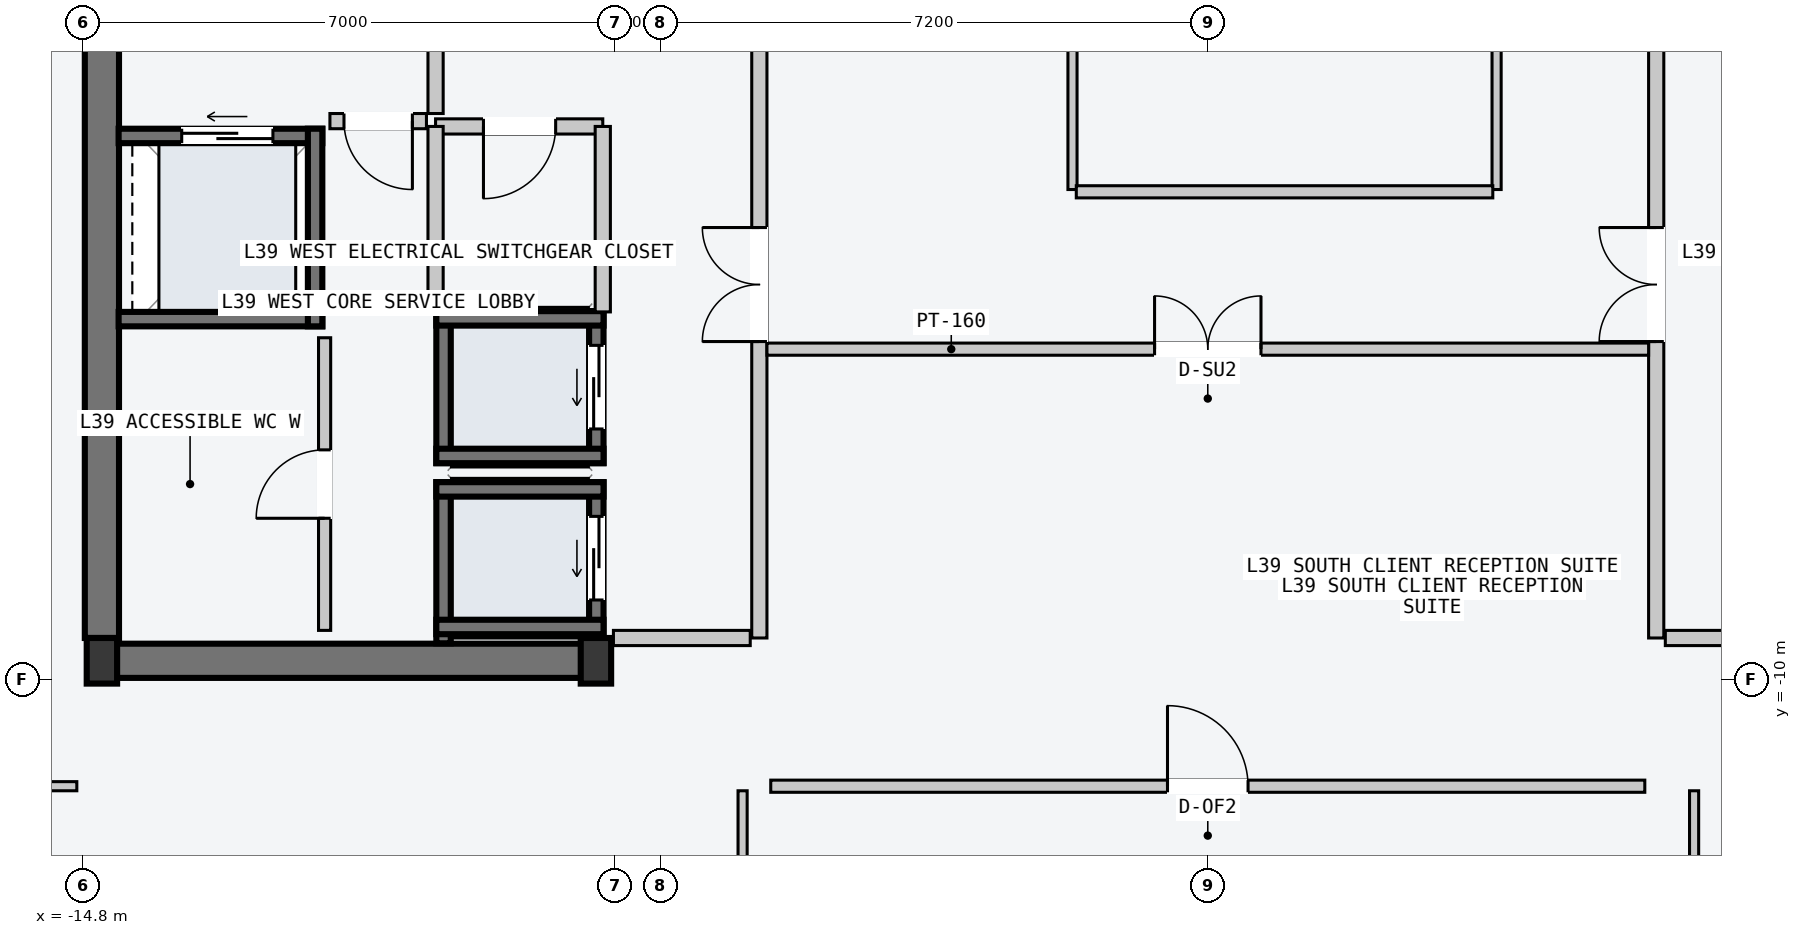
"""IFC4 building model, lengths in metres.
Left out: names, types, materials, properties, quantities, classifications, styles, units other than length and angle.
Written with IfcOpenShell. Run it as: python <this file> out.ifc"""

import sys

from ifc_helpers import new_model, si_unit, direction, frame, frame_2d, origin, origin_2d, place, context, subcontext, project, spatial, rectangle, i_section, extrude, element, fill, save


model = new_model("IFC4")
c1 = context("Model", 3, precision=1e-05, world=origin(), true_north=direction((0.0, 1.0)))
c2 = subcontext(c1, "Body", "Model", "MODEL_VIEW")
j1 = project(units=[si_unit("LENGTHUNIT", "METRE"), si_unit("PLANEANGLEUNIT", "RADIAN")], contexts=[c1])
p1 = place(None, origin())
s1 = spatial("IfcSite", under=j1, at=p1, CompositionType="ELEMENT")
p2 = place(p1, origin())
s2 = spatial("IfcBuilding", under=s1, at=p2, CompositionType="ELEMENT")
p3 = place(p2, frame((0.0, 0.0, 150.6)))
s3 = spatial("IfcBuildingStorey", under=s2, at=p3, CompositionType="ELEMENT", Elevation=150.6)
p4 = place(p3, frame((-14.53, -9.75, -0.2), z_axis=(0.0, 0.0, 1.0), x_axis=(1.0, 0.0, 0.0)))
e1 = element("IfcWall", 1, at=p4, inside=s3, PredefinedType="SHEAR", context=c2, shape_type="SweptSolid", body=[
    extrude(rectangle(XDim=6.46, YDim=0.45, at=frame_2d((3.23, 0.0))), origin(), (0.0, 0.0, 1.0), 4.5),
])
p5 = place(p3, frame((-14.55, -9.45, -0.2), z_axis=(0.0, 0.0, 1.0), x_axis=(0.0, 1.0, 0.0)))
e2 = element("IfcWall", 2, at=p5, inside=s3, PredefinedType="SHEAR", context=c2, shape_type="SweptSolid", body=[
    extrude(rectangle(XDim=9.15, YDim=0.45, at=frame_2d((4.575, 0.0))), origin(), (0.0, 0.0, 1.0), 4.5),
])
for number, where, z_axis, x_axis in (
    (3, (-14.55, -9.75, 0.0), (0.0, 0.0, 1.0), (1.0, 0.0, 0.0)),
    (4, (-8.05, -9.75, 0.0), (0.0, 0.0, 1.0), (1.0, 0.0, 0.0)),
):
    element("IfcColumn", number, at=place(p3, frame(where, z_axis=z_axis, x_axis=x_axis)), inside=s3, PredefinedType="COLUMN", context=c2, shape_type="SweptSolid", body=[
        extrude(i_section(OverallWidth=0.4, OverallDepth=0.6, WebThickness=0.022, FlangeThickness=0.036, at=origin_2d()), origin(), (0.0, 0.0, 1.0), 4.5),
    ])
p6 = place(p3, frame((-8.045, -9.52, -0.2), z_axis=(0.0, 0.0, 1.0), x_axis=(0.0, 1.0, 0.0)))
e5 = element("IfcWall", 5, at=p6, inside=s3, PredefinedType="SOLIDWALL", context=c2, shape_type="SweptSolid", body=[
    extrude(rectangle(XDim=2.12, YDim=0.19, at=frame_2d((1.06, 0.0))), origin(), (0.0, 0.0, 1.0), 4.5),
])
p7 = place(p6, frame((0.57, 0.0, 0.2)))
e6 = element("IfcOpeningElement", 6, at=p7, cuts=e5, PredefinedType="OPENING", context=c2, shape_type="SweptSolid", body=[
    extrude(rectangle(XDim=1.1, YDim=2.2, at=frame_2d((0.55, 1.1))), frame((0.0, 0.105, 0.0), z_axis=(0.0, -1.0, 0.0), x_axis=(1.0, 0.0, 0.0)), (0.0, 0.0, 1.0), 0.21),
])
p8 = place(p3, frame((-10.055, -9.52, -0.2), z_axis=(0.0, 0.0, 1.0), x_axis=(0.0, 1.0, 0.0)))
e7 = element("IfcWall", 7, at=p8, inside=s3, PredefinedType="SOLIDWALL", context=c2, shape_type="SweptSolid", body=[
    extrude(rectangle(XDim=2.12, YDim=0.19, at=frame_2d((1.06, 0.0))), origin(), (0.0, 0.0, 1.0), 4.5),
])
for number, where, z_axis, x_axis in (
    (8, (-10.15, -7.495, -0.2), (0.0, 0.0, 1.0), (1.0, 0.0, 0.0)),
    (9, (-10.15, -9.305, -0.2), (0.0, 0.0, 1.0), (1.0, 0.0, 0.0)),
):
    element("IfcWall", number, at=place(p3, frame(where, z_axis=z_axis, x_axis=x_axis)), inside=s3, PredefinedType="SOLIDWALL", context=c2, shape_type="SweptSolid", body=[
        extrude(rectangle(XDim=2.2, YDim=0.19, at=frame_2d((1.1, 0.0))), origin(), (0.0, 0.0, 1.0), 4.5),
    ])
p9 = place(p3, frame((-8.045, -7.15, -0.2), z_axis=(0.0, 0.0, 1.0), x_axis=(0.0, 1.0, 0.0)))
e10 = element("IfcWall", 10, at=p9, inside=s3, PredefinedType="SOLIDWALL", context=c2, shape_type="SweptSolid", body=[
    extrude(rectangle(XDim=2.0, YDim=0.19, at=frame_2d((1.0, 0.0))), origin(), (0.0, 0.0, 1.0), 4.5),
])
p10 = place(p9, frame((0.45, 0.0, 0.2)))
e11 = element("IfcOpeningElement", 11, at=p10, cuts=e10, PredefinedType="OPENING", context=c2, shape_type="SweptSolid", body=[
    extrude(rectangle(XDim=1.1, YDim=2.2, at=frame_2d((0.55, 1.1))), frame((0.0, 0.105, 0.0), z_axis=(0.0, -1.0, 0.0), x_axis=(1.0, 0.0, 0.0)), (0.0, 0.0, 1.0), 0.21),
])
p11 = place(p3, frame((-10.055, -7.15, -0.2), z_axis=(0.0, 0.0, 1.0), x_axis=(0.0, 1.0, 0.0)))
e12 = element("IfcWall", 12, at=p11, inside=s3, PredefinedType="SOLIDWALL", context=c2, shape_type="SweptSolid", body=[
    extrude(rectangle(XDim=2.0, YDim=0.19, at=frame_2d((1.0, 0.0))), origin(), (0.0, 0.0, 1.0), 4.5),
])
for number, where, z_axis, x_axis in (
    (13, (-10.15, -5.245, -0.2), (0.0, 0.0, 1.0), (1.0, 0.0, 0.0)),
    (14, (-10.15, -7.055, -0.2), (0.0, 0.0, 1.0), (1.0, 0.0, 0.0)),
):
    element("IfcWall", number, at=place(p3, frame(where, z_axis=z_axis, x_axis=x_axis)), inside=s3, PredefinedType="SOLIDWALL", context=c2, shape_type="SweptSolid", body=[
        extrude(rectangle(XDim=2.2, YDim=0.19, at=frame_2d((1.1, 0.0))), origin(), (0.0, 0.0, 1.0), 4.5),
    ])
p12 = place(p3, frame((-14.33, -2.845, -0.2), z_axis=(0.0, 0.0, 1.0), x_axis=(1.0, 0.0, 0.0)))
e15 = element("IfcWall", 15, at=p12, inside=s3, PredefinedType="SOLIDWALL", context=c2, shape_type="SweptSolid", body=[
    extrude(rectangle(XDim=2.68, YDim=0.19, at=frame_2d((1.34, 0.0))), origin(), (0.0, 0.0, 1.0), 4.5),
])
p13 = place(p12, frame((0.83, 0.0, 0.2)))
e16 = element("IfcOpeningElement", 16, at=p13, cuts=e15, PredefinedType="OPENING", context=c2, shape_type="SweptSolid", body=[
    extrude(rectangle(XDim=1.2, YDim=2.2, at=frame_2d((0.6, 1.1))), frame((0.0, 0.105, 0.0), z_axis=(0.0, -1.0, 0.0), x_axis=(1.0, 0.0, 0.0)), (0.0, 0.0, 1.0), 0.21),
])
p14 = place(p3, frame((-14.33, -5.255, -0.2), z_axis=(0.0, 0.0, 1.0), x_axis=(1.0, 0.0, 0.0)))
e17 = element("IfcWall", 17, at=p14, inside=s3, PredefinedType="SOLIDWALL", context=c2, shape_type="SweptSolid", body=[
    extrude(rectangle(XDim=2.68, YDim=0.19, at=frame_2d((1.34, 0.0))), origin(), (0.0, 0.0, 1.0), 4.5),
])
p15 = place(p3, frame((-11.745, -5.35, -0.2), z_axis=(0.0, 0.0, 1.0), x_axis=(0.0, 1.0, 0.0)))
e18 = element("IfcWall", 18, at=p15, inside=s3, PredefinedType="SOLIDWALL", context=c2, shape_type="SweptSolid", body=[
    extrude(rectangle(XDim=2.6, YDim=0.19, at=frame_2d((1.3, 0.0))), origin(), (0.0, 0.0, 1.0), 4.5),
])
p16 = place(p3, frame((-5.9, -9.45, 0.0), z_axis=(0.0, 0.0, 1.0), x_axis=(0.0, 1.0, 0.0)))
e19 = element("IfcWall", 19, at=p16, inside=s3, PredefinedType="PARTITIONING", context=c2, shape_type="SweptSolid", body=[
    extrude(rectangle(XDim=10.5, YDim=0.2, at=frame_2d((5.25, 0.0))), origin(), (0.0, 0.0, 1.0), 4.3),
])
p17 = place(p16, frame((3.9, 0.0, 0.0)))
e20 = element("IfcOpeningElement", 20, at=p17, cuts=e19, PredefinedType="OPENING", context=c2, shape_type="SweptSolid", body=[
    extrude(rectangle(XDim=1.5, YDim=2.2, at=frame_2d((0.75, 1.1))), frame((0.0, 0.11, 0.0), z_axis=(0.0, -1.0, 0.0), x_axis=(1.0, 0.0, 0.0)), (0.0, 0.0, 1.0), 0.22),
])
p18 = place(p3, frame((-6.02, -9.45, 0.0), z_axis=(0.0, 0.0, 1.0), x_axis=(-1.0, 0.0, 0.0)))
e21 = element("IfcWall", 21, at=p18, inside=s3, PredefinedType="PARTITIONING", context=c2, shape_type="SweptSolid", body=[
    extrude(rectangle(XDim=1.8, YDim=0.2, at=frame_2d((0.9, 0.0))), origin(), (0.0, 0.0, 1.0), 4.3),
])
p19 = place(p3, frame((-10.16, -2.55, 0.0), z_axis=(0.0, 0.0, 1.0), x_axis=(0.0, 1.0, 0.0)))
e22 = element("IfcWall", 22, at=p19, inside=s3, PredefinedType="PARTITIONING", context=c2, shape_type="SweptSolid", body=[
    extrude(rectangle(XDim=3.8, YDim=0.2, at=frame_2d((1.9, 0.0))), origin(), (0.0, 0.0, 1.0), 4.3),
])
p20 = place(p19, frame((1.3, 0.0, 0.0)))
e23 = element("IfcOpeningElement", 23, at=p20, cuts=e22, PredefinedType="OPENING", context=c2, shape_type="SweptSolid", body=[
    extrude(rectangle(XDim=1.1, YDim=2.15, at=frame_2d((0.55, 1.075))), frame((0.0, 0.11, 0.0), z_axis=(0.0, -1.0, 0.0), x_axis=(1.0, 0.0, 0.0)), (0.0, 0.0, 1.0), 0.22),
])
p21 = place(p3, frame((-10.28, -2.65, 0.0), z_axis=(0.0, 0.0, 1.0), x_axis=(-1.0, 0.0, 0.0)))
e24 = element("IfcWall", 24, at=p21, inside=s3, PredefinedType="PARTITIONING", context=c2, shape_type="SweptSolid", body=[
    extrude(rectangle(XDim=1.27, YDim=0.2, at=frame_2d((0.635, 0.0))), origin(), (0.0, 0.0, 1.0), 4.3),
])
p22 = place(p21, frame((0.185, 0.0, 0.0)))
e25 = element("IfcOpeningElement", 25, at=p22, cuts=e24, PredefinedType="OPENING", context=c2, shape_type="SweptSolid", body=[
    extrude(rectangle(XDim=0.9, YDim=2.15, at=frame_2d((0.45, 1.075))), frame((0.0, 0.11, 0.0), z_axis=(0.0, -1.0, 0.0), x_axis=(1.0, 0.0, 0.0)), (0.0, 0.0, 1.0), 0.22),
])
p23 = place(p3, frame((-7.96, -2.72, 0.0), z_axis=(0.0, 0.0, 1.0), x_axis=(-1.0, 0.0, 0.0)))
e26 = element("IfcWall", 26, at=p23, inside=s3, PredefinedType="PARTITIONING", context=c2, shape_type="SweptSolid", body=[
    extrude(rectangle(XDim=2.2, YDim=0.2, at=frame_2d((1.1, 0.0))), origin(), (0.0, 0.0, 1.0), 4.3),
])
p24 = place(p23, frame((0.62, 0.0, 0.0)))
e27 = element("IfcOpeningElement", 27, at=p24, cuts=e26, PredefinedType="OPENING", context=c2, shape_type="SweptSolid", body=[
    extrude(rectangle(XDim=0.95, YDim=2.1, at=frame_2d((0.475, 1.05))), frame((0.0, 0.11, 0.0), z_axis=(0.0, -1.0, 0.0), x_axis=(1.0, 0.0, 0.0)), (0.0, 0.0, 1.0), 0.22),
])
for number, where, z_axis, x_axis in (
    (28, (-7.96, -5.16, 0.0), (0.0, 0.0, 1.0), (0.0, 1.0, 0.0)),
    (29, (-10.16, -5.16, 0.0), (0.0, 0.0, 1.0), (0.0, 1.0, 0.0)),
):
    element("IfcWall", number, at=place(p3, frame(where, z_axis=z_axis, x_axis=x_axis)), inside=s3, PredefinedType="PARTITIONING", context=c2, shape_type="SweptSolid", body=[
        extrude(rectangle(XDim=2.44, YDim=0.2, at=frame_2d((1.22, 0.0))), origin(), (0.0, 0.0, 1.0), 4.3),
    ])
p25 = place(p3, frame((-11.62, -9.35, 0.0), z_axis=(0.0, 0.0, 1.0), x_axis=(0.0, 1.0, 0.0)))
e30 = element("IfcWall", 30, at=p25, inside=s3, PredefinedType="PARTITIONING", context=c2, shape_type="SweptSolid", body=[
    extrude(rectangle(XDim=3.85, YDim=0.16, at=frame_2d((1.925, 0.0))), origin(), (0.0, 0.0, 1.0), 4.3),
])
p26 = place(p25, frame((1.475, 0.0, 0.0)))
e31 = element("IfcOpeningElement", 31, at=p26, cuts=e30, PredefinedType="OPENING", context=c2, shape_type="SweptSolid", body=[
    extrude(rectangle(XDim=0.9, YDim=2.15, at=frame_2d((0.45, 1.075))), frame((0.0, 0.09, 0.0), z_axis=(0.0, -1.0, 0.0), x_axis=(1.0, 0.0, 0.0)), (0.0, 0.0, 1.0), 0.18),
])
p27 = place(p3, frame((5.9, -9.45, 0.0), z_axis=(0.0, 0.0, 1.0), x_axis=(0.0, 1.0, 0.0)))
e32 = element("IfcWall", 32, at=p27, inside=s3, PredefinedType="PARTITIONING", context=c2, shape_type="SweptSolid", body=[
    extrude(rectangle(XDim=18.9, YDim=0.2, at=frame_2d((9.45, 0.0))), origin(), (0.0, 0.0, 1.0), 4.3),
])
p28 = place(p27, frame((3.9, 0.0, 0.0)))
e33 = element("IfcOpeningElement", 33, at=p28, cuts=e32, PredefinedType="OPENING", context=c2, shape_type="SweptSolid", body=[
    extrude(rectangle(XDim=1.5, YDim=2.2, at=frame_2d((0.75, 1.1))), frame((0.0, 0.11, 0.0), z_axis=(0.0, -1.0, 0.0), x_axis=(1.0, 0.0, 0.0)), (0.0, 0.0, 1.0), 0.22),
])
p29 = place(p3, frame((6.02, -9.45, 0.0), z_axis=(0.0, 0.0, 1.0), x_axis=(1.0, 0.0, 0.0)))
e34 = element("IfcWall", 34, at=p29, inside=s3, PredefinedType="PARTITIONING", context=c2, shape_type="SweptSolid", body=[
    extrude(rectangle(XDim=1.8, YDim=0.2, at=frame_2d((0.9, 0.0))), origin(), (0.0, 0.0, 1.0), 4.3),
])
for number, where, z_axis, x_axis in (
    (35, (-1.78, -3.55, 0.0), (0.0, 0.0, 1.0), (0.0, 1.0, 0.0)),
    (36, (3.8, -3.55, 0.0), (0.0, 0.0, 1.0), (0.0, 1.0, 0.0)),
):
    element("IfcWall", number, at=place(p3, frame(where, z_axis=z_axis, x_axis=x_axis)), inside=s3, PredefinedType="PARTITIONING", context=c2, shape_type="SweptSolid", body=[
        extrude(rectangle(XDim=13.28, YDim=0.12, at=frame_2d((6.64, 0.0))), origin(), (0.0, 0.0, 1.0), 4.3),
    ])
p30 = place(p3, frame((-1.73, -3.58, 0.0), z_axis=(0.0, 0.0, 1.0), x_axis=(1.0, 0.0, 0.0)))
e37 = element("IfcWall", 37, at=p30, inside=s3, PredefinedType="PARTITIONING", context=c2, shape_type="SweptSolid", body=[
    extrude(rectangle(XDim=5.48, YDim=0.16, at=frame_2d((2.74, 0.0))), origin(), (0.0, 0.0, 1.0), 4.3),
])
p31 = place(p3, frame((-5.8, -5.65, 0.0), z_axis=(0.0, 0.0, 1.0), x_axis=(1.0, 0.0, 0.0)))
e38 = element("IfcWall", 38, at=p31, inside=s3, PredefinedType="PARTITIONING", context=c2, shape_type="SweptSolid", body=[
    extrude(rectangle(XDim=11.6, YDim=0.16, at=frame_2d((5.8, 0.0))), origin(), (0.0, 0.0, 1.0), 4.3),
])
p32 = place(p31, frame((5.1, 0.0, 0.0)))
e39 = element("IfcOpeningElement", 39, at=p32, cuts=e38, PredefinedType="OPENING", context=c2, shape_type="SweptSolid", body=[
    extrude(rectangle(XDim=1.4, YDim=2.2, at=frame_2d((0.7, 1.1))), frame((0.0, 0.09, 0.0), z_axis=(0.0, -1.0, 0.0), x_axis=(1.0, 0.0, 0.0)), (0.0, 0.0, 1.0), 0.18),
])
p33 = place(p3, frame((-6.12, -18.56, 0.0), z_axis=(0.0, 0.0, 1.0), x_axis=(0.0, 1.0, 0.0)))
e40 = element("IfcWall", 40, at=p33, inside=s3, PredefinedType="PARTITIONING", context=c2, shape_type="SweptSolid", body=[
    extrude(rectangle(XDim=7.1, YDim=0.12, at=frame_2d((3.55, 0.0))), origin(), (0.0, 0.0, 1.0), 4.3),
])
p34 = place(p33, frame((1.05, 0.0, 0.0)))
e41 = element("IfcOpeningElement", 41, at=p34, cuts=e40, PredefinedType="OPENING", context=c2, shape_type="SweptSolid", body=[
    extrude(rectangle(XDim=0.96, YDim=2.18, at=frame_2d((0.48, 1.09))), frame((0.0, 0.07, 0.0), z_axis=(0.0, -1.0, 0.0), x_axis=(1.0, 0.0, 0.0)), (0.0, 0.0, 1.0), 0.14),
])
p35 = place(p3, frame((6.399, -18.56, 0.0), z_axis=(0.0, 0.0, 1.0), x_axis=(0.0, 1.0, 0.0)))
e42 = element("IfcWall", 42, at=p35, inside=s3, PredefinedType="PARTITIONING", context=c2, shape_type="SweptSolid", body=[
    extrude(rectangle(XDim=7.1, YDim=0.12, at=frame_2d((3.55, 0.0))), origin(), (0.0, 0.0, 1.0), 4.3),
])
p36 = place(p35, frame((1.34, 0.0, 0.0)))
e43 = element("IfcOpeningElement", 43, at=p36, cuts=e42, PredefinedType="OPENING", context=c2, shape_type="SweptSolid", body=[
    extrude(rectangle(XDim=0.96, YDim=2.18, at=frame_2d((0.48, 1.09))), frame((0.0, 0.07, 0.0), z_axis=(0.0, -1.0, 0.0), x_axis=(1.0, 0.0, 0.0)), (0.0, 0.0, 1.0), 0.14),
])
p37 = place(p3, frame((-5.75, -11.4, 0.0), z_axis=(0.0, 0.0, 1.0), x_axis=(1.0, 0.0, 0.0)))
e44 = element("IfcWall", 44, at=p37, inside=s3, PredefinedType="PARTITIONING", context=c2, shape_type="SweptSolid", body=[
    extrude(rectangle(XDim=11.5, YDim=0.16, at=frame_2d((5.75, 0.0))), origin(), (0.0, 0.0, 1.0), 4.3),
])
p38 = place(p37, frame((5.22, 0.0, 0.0)))
e45 = element("IfcOpeningElement", 45, at=p38, cuts=e44, PredefinedType="OPENING", context=c2, shape_type="SweptSolid", body=[
    extrude(rectangle(XDim=1.06, YDim=2.2, at=frame_2d((0.53, 1.1))), frame((0.0, 0.09, 0.0), z_axis=(0.0, -1.0, 0.0), x_axis=(1.0, 0.0, 0.0)), (0.0, 0.0, 1.0), 0.18),
])
p39 = place(p3, frame((-20.56, -11.4, 0.0), z_axis=(0.0, 0.0, 1.0), x_axis=(1.0, 0.0, 0.0)))
e46 = element("IfcWall", 46, at=p39, inside=s3, PredefinedType="PARTITIONING", context=c2, shape_type="SweptSolid", body=[
    extrude(rectangle(XDim=5.68, YDim=0.12, at=frame_2d((2.84, 0.0))), origin(), (0.0, 0.0, 1.0), 4.3),
])
p40 = place(p39, frame((2.36, 0.0, 0.0)))
e47 = element("IfcOpeningElement", 47, at=p40, cuts=e46, PredefinedType="OPENING", context=c2, shape_type="SweptSolid", body=[
    extrude(rectangle(XDim=0.96, YDim=2.18, at=frame_2d((0.48, 1.09))), frame((0.0, 0.07, 0.0), z_axis=(0.0, -1.0, 0.0), x_axis=(1.0, 0.0, 0.0)), (0.0, 0.0, 1.0), 0.14),
])
p41 = place(p7, origin())
e48 = element("IfcDoor", 48, at=p41, inside=s3, OperationType="SLIDING_TO_LEFT", PredefinedType="DOOR", context=c2, shape_type="SweptSolid", body=[
    extrude(rectangle(XDim=1.1, YDim=2.2, at=frame_2d((0.55, 1.1))), frame((0.0, 0.025, 0.0), z_axis=(0.0, -1.0, 0.0), x_axis=(1.0, 0.0, 0.0)), (0.0, 0.0, 1.0), 0.05),
])
fill(e6, e48)
p42 = place(p10, origin())
e49 = element("IfcDoor", 49, at=p42, inside=s3, OperationType="SLIDING_TO_LEFT", PredefinedType="DOOR", context=c2, shape_type="SweptSolid", body=[
    extrude(rectangle(XDim=1.1, YDim=2.2, at=frame_2d((0.55, 1.1))), frame((0.0, 0.025, 0.0), z_axis=(0.0, -1.0, 0.0), x_axis=(1.0, 0.0, 0.0)), (0.0, 0.0, 1.0), 0.05),
])
fill(e11, e49)
p43 = place(p13, origin())
e50 = element("IfcDoor", 50, at=p43, inside=s3, OperationType="SLIDING_TO_LEFT", PredefinedType="DOOR", context=c2, shape_type="SweptSolid", body=[
    extrude(rectangle(XDim=1.2, YDim=2.2, at=frame_2d((0.6, 1.1))), frame((0.0, 0.025, 0.0), z_axis=(0.0, -1.0, 0.0), x_axis=(1.0, 0.0, 0.0)), (0.0, 0.0, 1.0), 0.05),
])
fill(e16, e50)
p44 = place(p17, origin())
e51 = element("IfcDoor", 51, at=p44, inside=s3, OperationType="DOUBLE_DOOR_SINGLE_SWING", PredefinedType="DOOR", context=c2, shape_type="SweptSolid", body=[
    extrude(rectangle(XDim=1.5, YDim=2.2, at=frame_2d((0.75, 1.1))), frame((0.0, 0.025, 0.0), z_axis=(0.0, -1.0, 0.0), x_axis=(1.0, 0.0, 0.0)), (0.0, 0.0, 1.0), 0.05),
])
fill(e20, e51)
p45 = place(p22, origin())
e52 = element("IfcDoor", 52, at=p45, inside=s3, OperationType="SINGLE_SWING_LEFT", PredefinedType="DOOR", context=c2, shape_type="SweptSolid", body=[
    extrude(rectangle(XDim=0.9, YDim=2.15, at=frame_2d((0.45, 1.075))), frame((0.0, 0.025, 0.0), z_axis=(0.0, -1.0, 0.0), x_axis=(1.0, 0.0, 0.0)), (0.0, 0.0, 1.0), 0.05),
])
fill(e25, e52)
p46 = place(p24, origin())
e53 = element("IfcDoor", 53, at=p46, inside=s3, OperationType="SINGLE_SWING_RIGHT", PredefinedType="DOOR", context=c2, shape_type="SweptSolid", body=[
    extrude(rectangle(XDim=0.95, YDim=2.1, at=frame_2d((0.475, 1.05))), frame((0.0, 0.025, 0.0), z_axis=(0.0, -1.0, 0.0), x_axis=(1.0, 0.0, 0.0)), (0.0, 0.0, 1.0), 0.05),
])
fill(e27, e53)
p47 = place(p26, origin())
e54 = element("IfcDoor", 54, at=p47, inside=s3, OperationType="SINGLE_SWING_LEFT", PredefinedType="DOOR", context=c2, shape_type="SweptSolid", body=[
    extrude(rectangle(XDim=0.9, YDim=2.15, at=frame_2d((0.45, 1.075))), frame((0.0, 0.025, 0.0), z_axis=(0.0, -1.0, 0.0), x_axis=(1.0, 0.0, 0.0)), (0.0, 0.0, 1.0), 0.05),
])
fill(e31, e54)
p48 = place(p28, origin())
e55 = element("IfcDoor", 55, at=p48, inside=s3, OperationType="DOUBLE_DOOR_SINGLE_SWING", PredefinedType="DOOR", context=c2, shape_type="SweptSolid", body=[
    extrude(rectangle(XDim=1.5, YDim=2.2, at=frame_2d((0.75, 1.1))), frame((0.0, 0.025, 0.0), z_axis=(0.0, -1.0, 0.0), x_axis=(1.0, 0.0, 0.0)), (0.0, 0.0, 1.0), 0.05),
])
fill(e33, e55)
p49 = place(p32, origin())
e56 = element("IfcDoor", 56, at=p49, inside=s3, OperationType="DOUBLE_DOOR_SINGLE_SWING", PredefinedType="DOOR", context=c2, shape_type="SweptSolid", body=[
    extrude(rectangle(XDim=1.4, YDim=2.2, at=frame_2d((0.7, 1.1))), frame((0.0, 0.025, 0.0), z_axis=(0.0, -1.0, 0.0), x_axis=(1.0, 0.0, 0.0)), (0.0, 0.0, 1.0), 0.05),
])
fill(e39, e56)
p50 = place(p38, origin())
e57 = element("IfcDoor", 57, at=p50, inside=s3, OperationType="SINGLE_SWING_LEFT", PredefinedType="DOOR", context=c2, shape_type="SweptSolid", body=[
    extrude(rectangle(XDim=1.06, YDim=2.2, at=frame_2d((0.53, 1.1))), frame((0.0, 0.025, 0.0), z_axis=(0.0, -1.0, 0.0), x_axis=(1.0, 0.0, 0.0)), (0.0, 0.0, 1.0), 0.05),
])
fill(e45, e57)
save(model, sys.argv[1])
